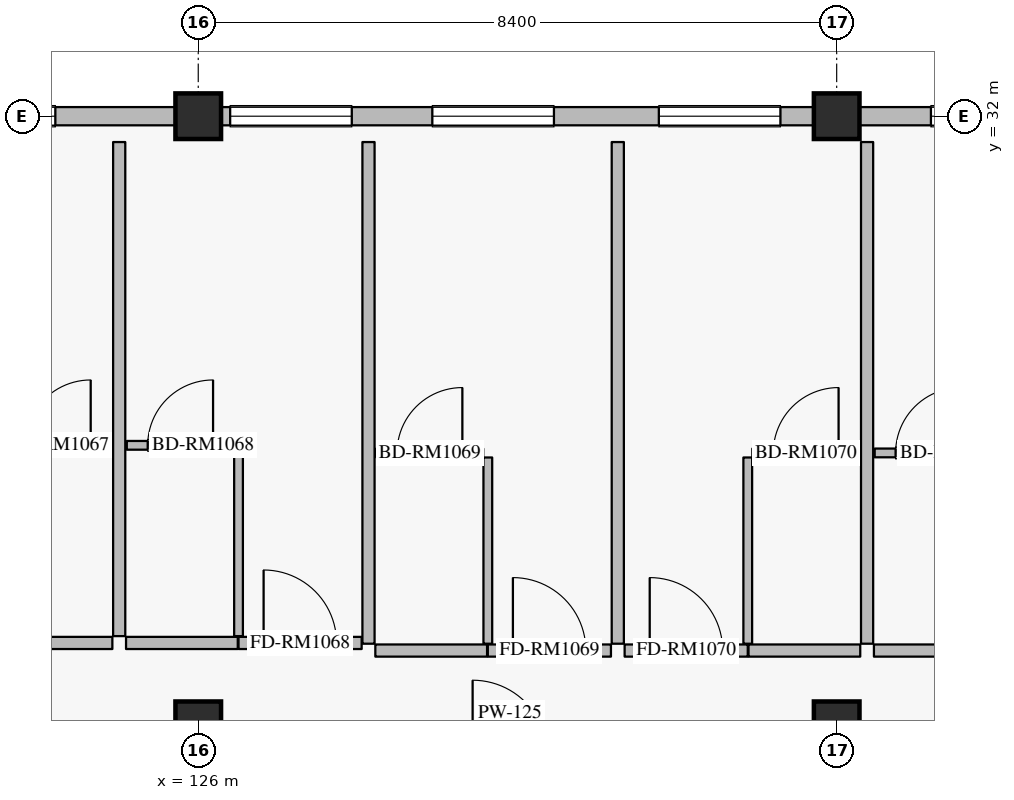
"""IFC4 building model, lengths in metres.
Left out: names, types, materials, properties, quantities, classifications, styles, units other than length and angle.
Written with IfcOpenShell. Run it as: python <this file> out.ifc"""

import sys

from ifc_helpers import new_model, si_unit, direction, frame, frame_2d, origin, origin_2d, place, context, subcontext, project, spatial, rectangle, extrude, element, fill, save


model = new_model("IFC4")
c1 = context("Model", 3, precision=1e-05, world=origin(), true_north=direction((0.0, 1.0)))
c2 = subcontext(c1, "Body", "Model", "MODEL_VIEW")
j1 = project(units=[si_unit("LENGTHUNIT", "METRE"), si_unit("PLANEANGLEUNIT", "RADIAN")], contexts=[c1])
p1 = place(None, origin())
s1 = spatial("IfcSite", under=j1, at=p1, CompositionType="ELEMENT")
p2 = place(p1, origin())
s2 = spatial("IfcBuilding", under=s1, at=p2, CompositionType="ELEMENT")
p3 = place(p2, frame((0.0, 0.0, 39.6)))
s3 = spatial("IfcBuildingStorey", under=s2, at=p3, CompositionType="ELEMENT", Elevation=39.6)
for number, where, z_axis, x_axis in (
    (1, (126.0, 32.0, 0.0), (0.0, 0.0, 1.0), (1.0, 0.0, 0.0)),
    (2, (134.4, 32.0, 0.0), (0.0, 0.0, 1.0), (1.0, 0.0, 0.0)),
    (3, (126.0, 24.0, 0.0), (0.0, 0.0, 1.0), (1.0, 0.0, 0.0)),
    (4, (134.4, 24.0, 0.0), (0.0, 0.0, 1.0), (1.0, 0.0, 0.0)),
):
    element("IfcColumn", number, at=place(p3, frame(where, z_axis=z_axis, x_axis=x_axis)), inside=s3, PredefinedType="COLUMN", context=c2, shape_type="SweptSolid", body=[
        extrude(rectangle(XDim=0.6, YDim=0.6, at=origin_2d()), origin(), (0.0, 0.0, 1.0), 3.6),
    ])
p4 = place(p3, frame((117.9, 32.0, 0.0), z_axis=(0.0, 0.0, 1.0), x_axis=(1.0, 0.0, 0.0)))
e5 = element("IfcWall", 5, at=p4, inside=s3, PredefinedType="SOLIDWALL", context=c2, shape_type="SweptSolid", body=[
    extrude(rectangle(XDim=7.8, YDim=0.24, at=frame_2d((3.9, 0.0))), origin(), (0.0, 0.0, 1.0), 2.89),
])
p5 = place(p4, frame((1.34, 0.0, 0.8)))
e6 = element("IfcOpeningElement", 6, at=p5, cuts=e5, PredefinedType="OPENING", context=c2, shape_type="SweptSolid", body=[
    extrude(rectangle(XDim=1.6, YDim=1.6, at=frame_2d((0.8, 0.8))), frame((0.0, 0.13, 0.0), z_axis=(0.0, -1.0, 0.0), x_axis=(1.0, 0.0, 0.0)), (0.0, 0.0, 1.0), 0.26),
])
p6 = place(p4, frame((4.62, 0.0, 0.8)))
e7 = element("IfcOpeningElement", 7, at=p6, cuts=e5, PredefinedType="OPENING", context=c2, shape_type="SweptSolid", body=[
    extrude(rectangle(XDim=1.6, YDim=1.6, at=frame_2d((0.8, 0.8))), frame((0.0, 0.13, 0.0), z_axis=(0.0, -1.0, 0.0), x_axis=(1.0, 0.0, 0.0)), (0.0, 0.0, 1.0), 0.26),
])
p7 = place(p3, frame((126.3, 32.0, 0.0), z_axis=(0.0, 0.0, 1.0), x_axis=(1.0, 0.0, 0.0)))
e8 = element("IfcWall", 8, at=p7, inside=s3, PredefinedType="SOLIDWALL", context=c2, shape_type="SweptSolid", body=[
    extrude(rectangle(XDim=7.8, YDim=0.24, at=frame_2d((3.9, 0.0))), origin(), (0.0, 0.0, 1.0), 2.89),
])
p8 = place(p7, frame((0.12, 0.0, 0.8)))
e9 = element("IfcOpeningElement", 9, at=p8, cuts=e8, PredefinedType="OPENING", context=c2, shape_type="SweptSolid", body=[
    extrude(rectangle(XDim=1.6, YDim=1.6, at=frame_2d((0.8, 0.8))), frame((0.0, 0.13, 0.0), z_axis=(0.0, -1.0, 0.0), x_axis=(1.0, 0.0, 0.0)), (0.0, 0.0, 1.0), 0.26),
])
p9 = place(p7, frame((2.78, 0.0, 0.8)))
e10 = element("IfcOpeningElement", 10, at=p9, cuts=e8, PredefinedType="OPENING", context=c2, shape_type="SweptSolid", body=[
    extrude(rectangle(XDim=1.6, YDim=1.6, at=frame_2d((0.8, 0.8))), frame((0.0, 0.13, 0.0), z_axis=(0.0, -1.0, 0.0), x_axis=(1.0, 0.0, 0.0)), (0.0, 0.0, 1.0), 0.26),
])
p10 = place(p7, frame((5.76, 0.0, 0.8)))
e11 = element("IfcOpeningElement", 11, at=p10, cuts=e8, PredefinedType="OPENING", context=c2, shape_type="SweptSolid", body=[
    extrude(rectangle(XDim=1.6, YDim=1.6, at=frame_2d((0.8, 0.8))), frame((0.0, 0.13, 0.0), z_axis=(0.0, -1.0, 0.0), x_axis=(1.0, 0.0, 0.0)), (0.0, 0.0, 1.0), 0.26),
])
p11 = place(p3, frame((134.7, 32.0, 0.0), z_axis=(0.0, 0.0, 1.0), x_axis=(1.0, 0.0, 0.0)))
e12 = element("IfcWall", 12, at=p11, inside=s3, PredefinedType="SOLIDWALL", context=c2, shape_type="SweptSolid", body=[
    extrude(rectangle(XDim=7.8, YDim=0.24, at=frame_2d((3.9, 0.0))), origin(), (0.0, 0.0, 1.0), 2.94),
])
p12 = place(p11, frame((0.94, 0.0, 0.8)))
e13 = element("IfcOpeningElement", 13, at=p12, cuts=e12, PredefinedType="OPENING", context=c2, shape_type="SweptSolid", body=[
    extrude(rectangle(XDim=1.6, YDim=1.6, at=frame_2d((0.8, 0.8))), frame((0.0, 0.13, 0.0), z_axis=(0.0, -1.0, 0.0), x_axis=(1.0, 0.0, 0.0)), (0.0, 0.0, 1.0), 0.26),
])
p13 = place(p11, frame((4.22, 0.0, 0.8)))
e14 = element("IfcOpeningElement", 14, at=p13, cuts=e12, PredefinedType="OPENING", context=c2, shape_type="SweptSolid", body=[
    extrude(rectangle(XDim=1.6, YDim=1.6, at=frame_2d((0.8, 0.8))), frame((0.0, 0.13, 0.0), z_axis=(0.0, -1.0, 0.0), x_axis=(1.0, 0.0, 0.0)), (0.0, 0.0, 1.0), 0.26),
])
p14 = place(p3, frame((123.4, 25.07, 0.0), z_axis=(0.0, 0.0, 1.0), x_axis=(1.0, 0.0, 0.0)))
e15 = element("IfcWall", 15, at=p14, inside=s3, PredefinedType="PARTITIONING", context=c2, shape_type="SweptSolid", body=[
    extrude(rectangle(XDim=1.47, YDim=0.16, at=frame_2d((0.735, 0.0))), origin(), (0.0, 0.0, 1.0), 3.335),
])
p15 = place(p3, frame((123.45, 27.67, 0.0), z_axis=(0.0, 0.0, 1.0), x_axis=(1.0, 0.0, 0.0)))
e16 = element("IfcWall", 16, at=p15, inside=s3, PredefinedType="PARTITIONING", context=c2, shape_type="SweptSolid", body=[
    extrude(rectangle(XDim=1.41, YDim=0.115, at=frame_2d((0.705, 0.0))), origin(), (0.0, 0.0, 1.0), 3.335),
])
p16 = place(p15, frame((0.275, 0.0, 0.0)))
e17 = element("IfcOpeningElement", 17, at=p16, cuts=e16, PredefinedType="OPENING", context=c2, shape_type="SweptSolid", body=[
    extrude(rectangle(XDim=0.86, YDim=2.12, at=frame_2d((0.43, 1.06))), frame((0.0, 0.067, 0.0), z_axis=(0.0, -1.0, 0.0), x_axis=(1.0, 0.0, 0.0)), (0.0, 0.0, 1.0), 0.135),
])
p17 = place(p3, frame((125.05, 25.07, 0.0), z_axis=(0.0, 0.0, 1.0), x_axis=(1.0, 0.0, 0.0)))
e18 = element("IfcWall", 18, at=p17, inside=s3, PredefinedType="PARTITIONING", context=c2, shape_type="SweptSolid", body=[
    extrude(rectangle(XDim=1.47, YDim=0.16, at=frame_2d((0.735, 0.0))), origin(), (0.0, 0.0, 1.0), 3.335),
])
p18 = place(p3, frame((126.53, 25.07, 0.0), z_axis=(0.0, 0.0, 1.0), x_axis=(1.0, 0.0, 0.0)))
e19 = element("IfcWall", 19, at=p18, inside=s3, PredefinedType="PARTITIONING", context=c2, shape_type="SweptSolid", body=[
    extrude(rectangle(XDim=1.62, YDim=0.16, at=frame_2d((0.81, 0.0))), origin(), (0.0, 0.0, 1.0), 3.335),
])
p19 = place(p18, frame((0.33, 0.0, 0.0)))
e20 = element("IfcOpeningElement", 20, at=p19, cuts=e19, PredefinedType="OPENING", context=c2, shape_type="SweptSolid", body=[
    extrude(rectangle(XDim=0.96, YDim=2.2, at=frame_2d((0.48, 1.1))), frame((0.0, 0.09, 0.0), z_axis=(0.0, -1.0, 0.0), x_axis=(1.0, 0.0, 0.0)), (0.0, 0.0, 1.0), 0.18),
])
p20 = place(p3, frame((126.53, 25.16, 0.0), z_axis=(0.0, 0.0, 1.0), x_axis=(0.0, 1.0, 0.0)))
e21 = element("IfcWall", 21, at=p20, inside=s3, PredefinedType="PARTITIONING", context=c2, shape_type="SweptSolid", body=[
    extrude(rectangle(XDim=2.45, YDim=0.115, at=frame_2d((1.225, 0.0))), origin(), (0.0, 0.0, 1.0), 3.335),
])
p21 = place(p3, frame((125.06, 27.67, 0.0), z_axis=(0.0, 0.0, 1.0), x_axis=(1.0, 0.0, 0.0)))
e22 = element("IfcWall", 22, at=p21, inside=s3, PredefinedType="PARTITIONING", context=c2, shape_type="SweptSolid", body=[
    extrude(rectangle(XDim=1.41, YDim=0.115, at=frame_2d((0.705, 0.0))), origin(), (0.0, 0.0, 1.0), 3.335),
])
p22 = place(p21, frame((0.275, 0.0, 0.0)))
e23 = element("IfcOpeningElement", 23, at=p22, cuts=e22, PredefinedType="OPENING", context=c2, shape_type="SweptSolid", body=[
    extrude(rectangle(XDim=0.86, YDim=2.12, at=frame_2d((0.43, 1.06))), frame((0.0, 0.067, 0.0), z_axis=(0.0, -1.0, 0.0), x_axis=(1.0, 0.0, 0.0)), (0.0, 0.0, 1.0), 0.135),
])
p23 = place(p3, frame((124.96, 25.16, 0.0), z_axis=(0.0, 0.0, 1.0), x_axis=(0.0, 1.0, 0.0)))
e24 = element("IfcWall", 24, at=p23, inside=s3, PredefinedType="PARTITIONING", context=c2, shape_type="SweptSolid", body=[
    extrude(rectangle(XDim=6.5, YDim=0.16, at=frame_2d((3.25, 0.0))), origin(), (0.0, 0.0, 1.0), 3.335),
])
p24 = place(p3, frame((128.33, 24.97, 0.0), z_axis=(0.0, 0.0, 1.0), x_axis=(1.0, 0.0, 0.0)))
e25 = element("IfcWall", 25, at=p24, inside=s3, PredefinedType="PARTITIONING", context=c2, shape_type="SweptSolid", body=[
    extrude(rectangle(XDim=1.47, YDim=0.16, at=frame_2d((0.735, 0.0))), origin(), (0.0, 0.0, 1.0), 3.335),
])
p25 = place(p3, frame((129.81, 24.97, 0.0), z_axis=(0.0, 0.0, 1.0), x_axis=(1.0, 0.0, 0.0)))
e26 = element("IfcWall", 26, at=p25, inside=s3, PredefinedType="PARTITIONING", context=c2, shape_type="SweptSolid", body=[
    extrude(rectangle(XDim=1.62, YDim=0.16, at=frame_2d((0.81, 0.0))), origin(), (0.0, 0.0, 1.0), 3.335),
])
p26 = place(p25, frame((0.33, 0.0, 0.0)))
e27 = element("IfcOpeningElement", 27, at=p26, cuts=e26, PredefinedType="OPENING", context=c2, shape_type="SweptSolid", body=[
    extrude(rectangle(XDim=0.96, YDim=2.2, at=frame_2d((0.48, 1.1))), frame((0.0, 0.09, 0.0), z_axis=(0.0, -1.0, 0.0), x_axis=(1.0, 0.0, 0.0)), (0.0, 0.0, 1.0), 0.18),
])
p27 = place(p3, frame((129.81, 25.06, 0.0), z_axis=(0.0, 0.0, 1.0), x_axis=(0.0, 1.0, 0.0)))
e28 = element("IfcWall", 28, at=p27, inside=s3, PredefinedType="PARTITIONING", context=c2, shape_type="SweptSolid", body=[
    extrude(rectangle(XDim=2.45, YDim=0.115, at=frame_2d((1.225, 0.0))), origin(), (0.0, 0.0, 1.0), 3.335),
])
p28 = place(p3, frame((128.34, 27.57, 0.0), z_axis=(0.0, 0.0, 1.0), x_axis=(1.0, 0.0, 0.0)))
e29 = element("IfcWall", 29, at=p28, inside=s3, PredefinedType="PARTITIONING", context=c2, shape_type="SweptSolid", body=[
    extrude(rectangle(XDim=1.41, YDim=0.115, at=frame_2d((0.705, 0.0))), origin(), (0.0, 0.0, 1.0), 3.335),
])
p29 = place(p28, frame((0.275, 0.0, 0.0)))
e30 = element("IfcOpeningElement", 30, at=p29, cuts=e29, PredefinedType="OPENING", context=c2, shape_type="SweptSolid", body=[
    extrude(rectangle(XDim=0.86, YDim=2.12, at=frame_2d((0.43, 1.06))), frame((0.0, 0.067, 0.0), z_axis=(0.0, -1.0, 0.0), x_axis=(1.0, 0.0, 0.0)), (0.0, 0.0, 1.0), 0.135),
])
p30 = place(p3, frame((128.24, 25.06, 0.0), z_axis=(0.0, 0.0, 1.0), x_axis=(0.0, 1.0, 0.0)))
e31 = element("IfcWall", 31, at=p30, inside=s3, PredefinedType="PARTITIONING", context=c2, shape_type="SweptSolid", body=[
    extrude(rectangle(XDim=6.6, YDim=0.16, at=frame_2d((3.3, 0.0))), origin(), (0.0, 0.0, 1.0), 3.335),
])
p31 = place(p3, frame((131.61, 24.97, 0.0), z_axis=(0.0, 0.0, 1.0), x_axis=(1.0, 0.0, 0.0)))
e32 = element("IfcWall", 32, at=p31, inside=s3, PredefinedType="PARTITIONING", context=c2, shape_type="SweptSolid", body=[
    extrude(rectangle(XDim=1.62, YDim=0.16, at=frame_2d((0.81, 0.0))), origin(), (0.0, 0.0, 1.0), 3.335),
])
p32 = place(p31, frame((0.33, 0.0, 0.0)))
e33 = element("IfcOpeningElement", 33, at=p32, cuts=e32, PredefinedType="OPENING", context=c2, shape_type="SweptSolid", body=[
    extrude(rectangle(XDim=0.96, YDim=2.2, at=frame_2d((0.48, 1.1))), frame((0.0, 0.09, 0.0), z_axis=(0.0, -1.0, 0.0), x_axis=(1.0, 0.0, 0.0)), (0.0, 0.0, 1.0), 0.18),
])
p33 = place(p3, frame((133.24, 24.97, 0.0), z_axis=(0.0, 0.0, 1.0), x_axis=(1.0, 0.0, 0.0)))
e34 = element("IfcWall", 34, at=p33, inside=s3, PredefinedType="PARTITIONING", context=c2, shape_type="SweptSolid", body=[
    extrude(rectangle(XDim=1.47, YDim=0.16, at=frame_2d((0.735, 0.0))), origin(), (0.0, 0.0, 1.0), 3.335),
])
p34 = place(p3, frame((133.23, 25.06, 0.0), z_axis=(0.0, 0.0, 1.0), x_axis=(0.0, 1.0, 0.0)))
e35 = element("IfcWall", 35, at=p34, inside=s3, PredefinedType="PARTITIONING", context=c2, shape_type="SweptSolid", body=[
    extrude(rectangle(XDim=2.45, YDim=0.115, at=frame_2d((1.225, 0.0))), origin(), (0.0, 0.0, 1.0), 3.335),
])
p35 = place(p3, frame((133.29, 27.57, 0.0), z_axis=(0.0, 0.0, 1.0), x_axis=(1.0, 0.0, 0.0)))
e36 = element("IfcWall", 36, at=p35, inside=s3, PredefinedType="PARTITIONING", context=c2, shape_type="SweptSolid", body=[
    extrude(rectangle(XDim=1.41, YDim=0.115, at=frame_2d((0.705, 0.0))), origin(), (0.0, 0.0, 1.0), 3.335),
])
p36 = place(p35, frame((0.275, 0.0, 0.0)))
e37 = element("IfcOpeningElement", 37, at=p36, cuts=e36, PredefinedType="OPENING", context=c2, shape_type="SweptSolid", body=[
    extrude(rectangle(XDim=0.86, YDim=2.12, at=frame_2d((0.43, 1.06))), frame((0.0, 0.067, 0.0), z_axis=(0.0, -1.0, 0.0), x_axis=(1.0, 0.0, 0.0)), (0.0, 0.0, 1.0), 0.135),
])
p37 = place(p3, frame((131.52, 25.06, 0.0), z_axis=(0.0, 0.0, 1.0), x_axis=(0.0, 1.0, 0.0)))
e38 = element("IfcWall", 38, at=p37, inside=s3, PredefinedType="PARTITIONING", context=c2, shape_type="SweptSolid", body=[
    extrude(rectangle(XDim=6.6, YDim=0.16, at=frame_2d((3.3, 0.0))), origin(), (0.0, 0.0, 1.0), 3.335),
])
p38 = place(p3, frame((134.89, 24.97, 0.0), z_axis=(0.0, 0.0, 1.0), x_axis=(1.0, 0.0, 0.0)))
e39 = element("IfcWall", 39, at=p38, inside=s3, PredefinedType="PARTITIONING", context=c2, shape_type="SweptSolid", body=[
    extrude(rectangle(XDim=1.47, YDim=0.16, at=frame_2d((0.735, 0.0))), origin(), (0.0, 0.0, 1.0), 3.335),
])
p39 = place(p3, frame((134.9, 27.57, 0.0), z_axis=(0.0, 0.0, 1.0), x_axis=(1.0, 0.0, 0.0)))
e40 = element("IfcWall", 40, at=p39, inside=s3, PredefinedType="PARTITIONING", context=c2, shape_type="SweptSolid", body=[
    extrude(rectangle(XDim=1.41, YDim=0.115, at=frame_2d((0.705, 0.0))), origin(), (0.0, 0.0, 1.0), 3.335),
])
p40 = place(p39, frame((0.275, 0.0, 0.0)))
e41 = element("IfcOpeningElement", 41, at=p40, cuts=e40, PredefinedType="OPENING", context=c2, shape_type="SweptSolid", body=[
    extrude(rectangle(XDim=0.86, YDim=2.12, at=frame_2d((0.43, 1.06))), frame((0.0, 0.067, 0.0), z_axis=(0.0, -1.0, 0.0), x_axis=(1.0, 0.0, 0.0)), (0.0, 0.0, 1.0), 0.135),
])
p41 = place(p3, frame((134.8, 25.06, 0.0), z_axis=(0.0, 0.0, 1.0), x_axis=(0.0, 1.0, 0.0)))
e42 = element("IfcWall", 42, at=p41, inside=s3, PredefinedType="PARTITIONING", context=c2, shape_type="SweptSolid", body=[
    extrude(rectangle(XDim=6.6, YDim=0.16, at=frame_2d((3.3, 0.0))), origin(), (0.0, 0.0, 1.0), 3.335),
])
p42 = place(p6, origin())
e43 = element("IfcWindow", 43, at=p42, inside=s3, PartitioningType="SINGLE_PANEL", PredefinedType="WINDOW", context=c2, shape_type="SweptSolid", body=[
    extrude(rectangle(XDim=1.6, YDim=1.6, at=frame_2d((0.8, 0.8))), frame((0.0, 0.03, 0.0), z_axis=(0.0, -1.0, 0.0), x_axis=(1.0, 0.0, 0.0)), (0.0, 0.0, 1.0), 0.06),
])
fill(e7, e43)
p43 = place(p8, origin())
e44 = element("IfcWindow", 44, at=p43, inside=s3, PartitioningType="SINGLE_PANEL", PredefinedType="WINDOW", context=c2, shape_type="SweptSolid", body=[
    extrude(rectangle(XDim=1.6, YDim=1.6, at=frame_2d((0.8, 0.8))), frame((0.0, 0.03, 0.0), z_axis=(0.0, -1.0, 0.0), x_axis=(1.0, 0.0, 0.0)), (0.0, 0.0, 1.0), 0.06),
])
fill(e9, e44)
p44 = place(p9, origin())
e45 = element("IfcWindow", 45, at=p44, inside=s3, PartitioningType="SINGLE_PANEL", PredefinedType="WINDOW", context=c2, shape_type="SweptSolid", body=[
    extrude(rectangle(XDim=1.6, YDim=1.6, at=frame_2d((0.8, 0.8))), frame((0.0, 0.03, 0.0), z_axis=(0.0, -1.0, 0.0), x_axis=(1.0, 0.0, 0.0)), (0.0, 0.0, 1.0), 0.06),
])
fill(e10, e45)
p45 = place(p10, origin())
e46 = element("IfcWindow", 46, at=p45, inside=s3, PartitioningType="SINGLE_PANEL", PredefinedType="WINDOW", context=c2, shape_type="SweptSolid", body=[
    extrude(rectangle(XDim=1.6, YDim=1.6, at=frame_2d((0.8, 0.8))), frame((0.0, 0.03, 0.0), z_axis=(0.0, -1.0, 0.0), x_axis=(1.0, 0.0, 0.0)), (0.0, 0.0, 1.0), 0.06),
])
fill(e11, e46)
p46 = place(p12, origin())
e47 = element("IfcWindow", 47, at=p46, inside=s3, PartitioningType="SINGLE_PANEL", PredefinedType="WINDOW", context=c2, shape_type="SweptSolid", body=[
    extrude(rectangle(XDim=1.6, YDim=1.6, at=frame_2d((0.8, 0.8))), frame((0.0, 0.03, 0.0), z_axis=(0.0, -1.0, 0.0), x_axis=(1.0, 0.0, 0.0)), (0.0, 0.0, 1.0), 0.06),
])
fill(e13, e47)
p47 = place(p16, origin())
e48 = element("IfcDoor", 48, at=p47, inside=s3, OperationType="SINGLE_SWING_RIGHT", PredefinedType="DOOR", context=c2, shape_type="SweptSolid", body=[
    extrude(rectangle(XDim=0.86, YDim=2.12, at=frame_2d((0.43, 1.06))), frame((0.0, 0.025, 0.0), z_axis=(0.0, -1.0, 0.0), x_axis=(1.0, 0.0, 0.0)), (0.0, 0.0, 1.0), 0.05),
])
fill(e17, e48)
p48 = place(p19, origin())
e49 = element("IfcDoor", 49, at=p48, inside=s3, OperationType="SINGLE_SWING_LEFT", PredefinedType="DOOR", context=c2, shape_type="SweptSolid", body=[
    extrude(rectangle(XDim=0.96, YDim=2.2, at=frame_2d((0.48, 1.1))), frame((0.0, 0.025, 0.0), z_axis=(0.0, -1.0, 0.0), x_axis=(1.0, 0.0, 0.0)), (0.0, 0.0, 1.0), 0.05),
])
fill(e20, e49)
p49 = place(p22, origin())
e50 = element("IfcDoor", 50, at=p49, inside=s3, OperationType="SINGLE_SWING_RIGHT", PredefinedType="DOOR", context=c2, shape_type="SweptSolid", body=[
    extrude(rectangle(XDim=0.86, YDim=2.12, at=frame_2d((0.43, 1.06))), frame((0.0, 0.025, 0.0), z_axis=(0.0, -1.0, 0.0), x_axis=(1.0, 0.0, 0.0)), (0.0, 0.0, 1.0), 0.05),
])
fill(e23, e50)
p50 = place(p26, origin())
e51 = element("IfcDoor", 51, at=p50, inside=s3, OperationType="SINGLE_SWING_LEFT", PredefinedType="DOOR", context=c2, shape_type="SweptSolid", body=[
    extrude(rectangle(XDim=0.96, YDim=2.2, at=frame_2d((0.48, 1.1))), frame((0.0, 0.025, 0.0), z_axis=(0.0, -1.0, 0.0), x_axis=(1.0, 0.0, 0.0)), (0.0, 0.0, 1.0), 0.05),
])
fill(e27, e51)
p51 = place(p29, origin())
e52 = element("IfcDoor", 52, at=p51, inside=s3, OperationType="SINGLE_SWING_RIGHT", PredefinedType="DOOR", context=c2, shape_type="SweptSolid", body=[
    extrude(rectangle(XDim=0.86, YDim=2.12, at=frame_2d((0.43, 1.06))), frame((0.0, 0.025, 0.0), z_axis=(0.0, -1.0, 0.0), x_axis=(1.0, 0.0, 0.0)), (0.0, 0.0, 1.0), 0.05),
])
fill(e30, e52)
p52 = place(p32, origin())
e53 = element("IfcDoor", 53, at=p52, inside=s3, OperationType="SINGLE_SWING_LEFT", PredefinedType="DOOR", context=c2, shape_type="SweptSolid", body=[
    extrude(rectangle(XDim=0.96, YDim=2.2, at=frame_2d((0.48, 1.1))), frame((0.0, 0.025, 0.0), z_axis=(0.0, -1.0, 0.0), x_axis=(1.0, 0.0, 0.0)), (0.0, 0.0, 1.0), 0.05),
])
fill(e33, e53)
p53 = place(p36, origin())
e54 = element("IfcDoor", 54, at=p53, inside=s3, OperationType="SINGLE_SWING_RIGHT", PredefinedType="DOOR", context=c2, shape_type="SweptSolid", body=[
    extrude(rectangle(XDim=0.86, YDim=2.12, at=frame_2d((0.43, 1.06))), frame((0.0, 0.025, 0.0), z_axis=(0.0, -1.0, 0.0), x_axis=(1.0, 0.0, 0.0)), (0.0, 0.0, 1.0), 0.05),
])
fill(e37, e54)
p54 = place(p40, origin())
e55 = element("IfcDoor", 55, at=p54, inside=s3, OperationType="SINGLE_SWING_RIGHT", PredefinedType="DOOR", context=c2, shape_type="SweptSolid", body=[
    extrude(rectangle(XDim=0.86, YDim=2.12, at=frame_2d((0.43, 1.06))), frame((0.0, 0.025, 0.0), z_axis=(0.0, -1.0, 0.0), x_axis=(1.0, 0.0, 0.0)), (0.0, 0.0, 1.0), 0.05),
])
fill(e41, e55)
save(model, sys.argv[1])
